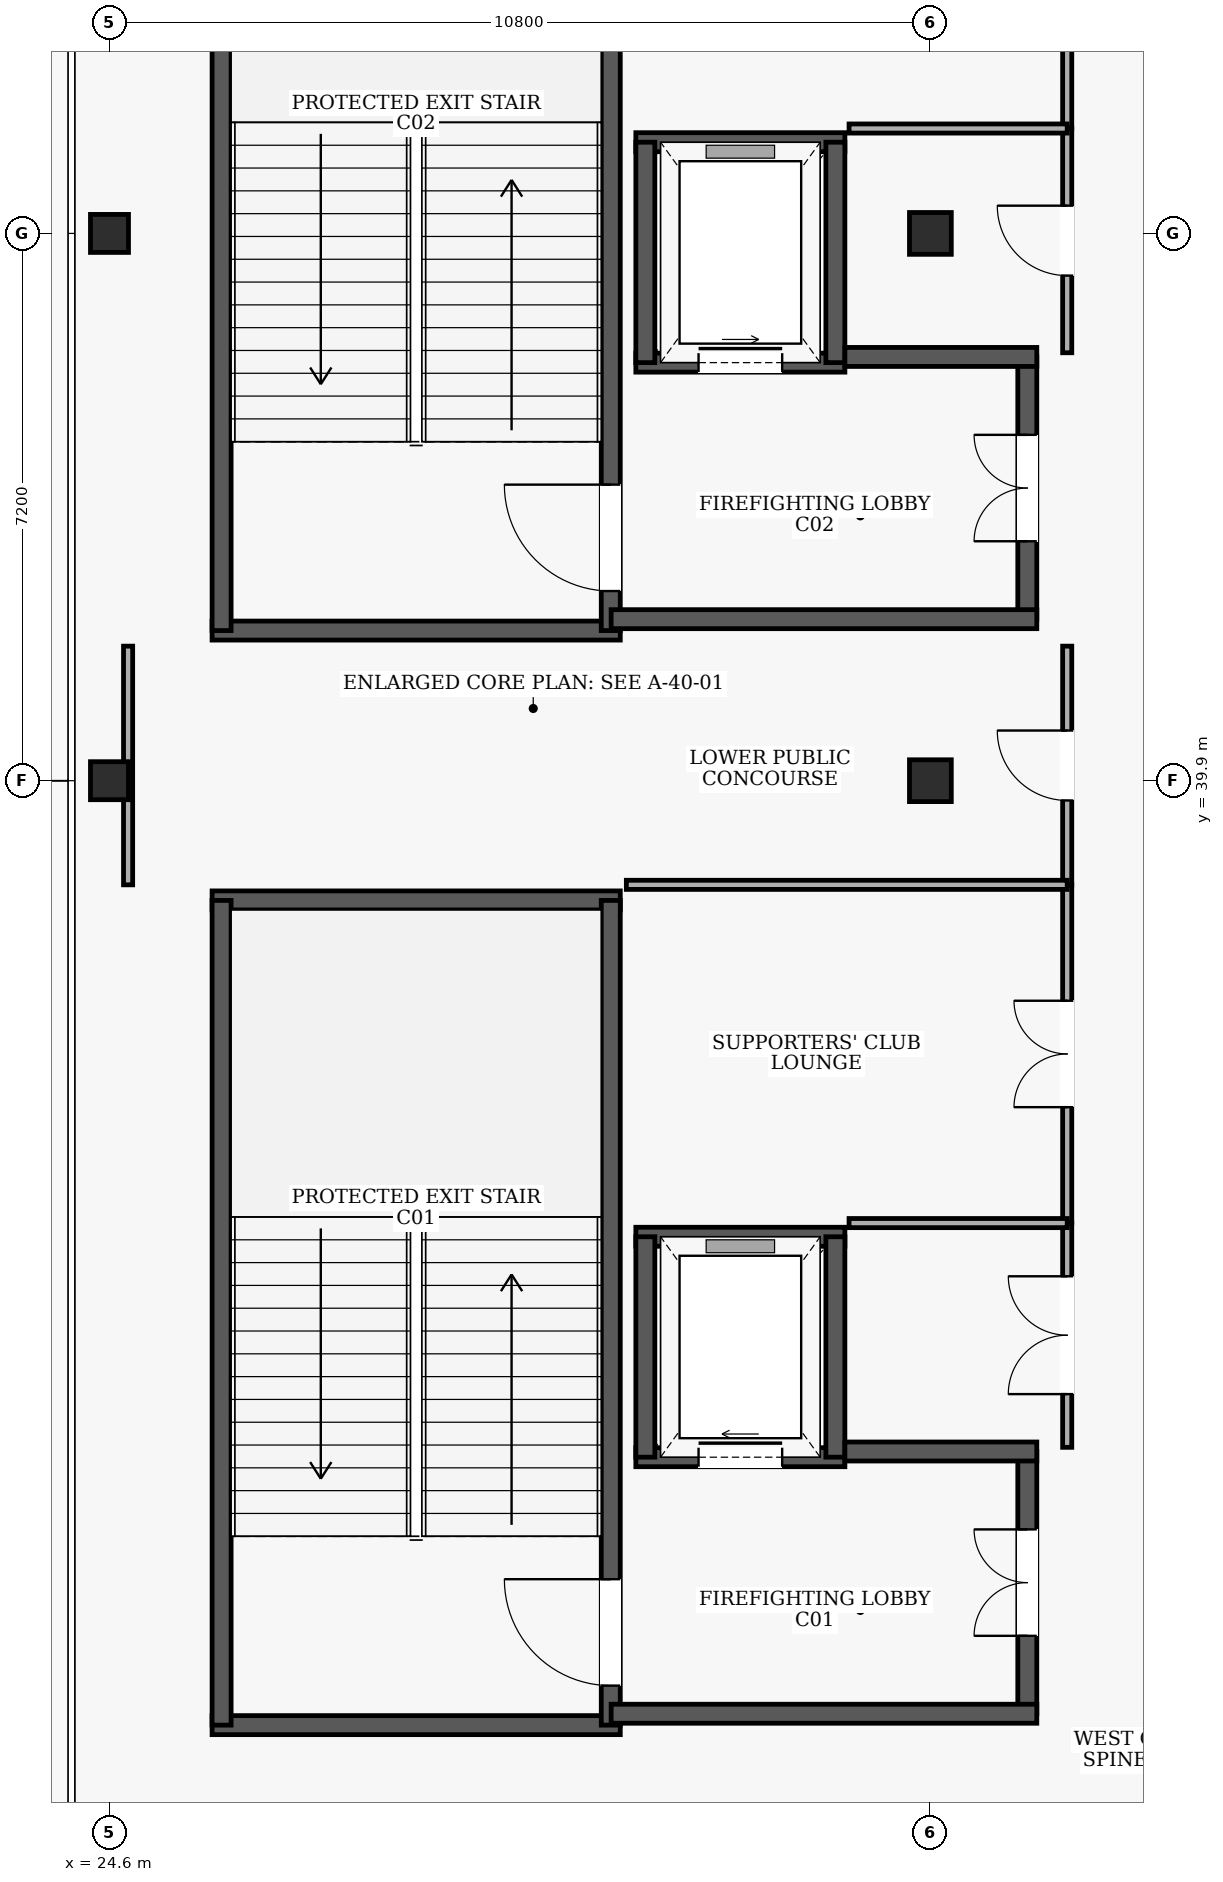
"""IFC4 building model, lengths in metres.
Left out: names, types, materials, properties, quantities, classifications, styles, units other than length and angle.
Written with IfcOpenShell. Run it as: python <this file> out.ifc"""

import sys

from ifc_helpers import new_model, si_unit, direction, frame, frame_2d, origin, origin_2d, place, context, subcontext, project, spatial, rectangle, extrude, element, fill, save


model = new_model("IFC4")
c1 = context("Model", 3, precision=1e-05, world=origin(), true_north=direction((0.0, 1.0)))
c2 = subcontext(c1, "Body", "Model", "MODEL_VIEW")
j1 = project(units=[si_unit("LENGTHUNIT", "METRE"), si_unit("PLANEANGLEUNIT", "RADIAN")], contexts=[c1])
p1 = place(None, origin())
s1 = spatial("IfcSite", under=j1, at=p1, CompositionType="ELEMENT")
p2 = place(p1, origin())
s2 = spatial("IfcBuilding", under=s1, at=p2, CompositionType="ELEMENT")
p3 = place(p2, frame((0.0, 0.0, 5.4)))
s3 = spatial("IfcBuildingStorey", under=s2, at=p3, CompositionType="ELEMENT", Elevation=5.4)
for number, where, z_axis, x_axis in (
    (1, (24.6, 39.9, 0.0), (0.0, 0.0, 1.0), (1.0, 0.0, 0.0)),
    (2, (24.6, 47.1, 0.0), (0.0, 0.0, 1.0), (1.0, 0.0, 0.0)),
):
    element("IfcColumn", number, at=place(p3, frame(where, z_axis=z_axis, x_axis=x_axis)), inside=s3, PredefinedType="COLUMN", context=c2, shape_type="SweptSolid", body=[
        extrude(rectangle(XDim=0.5, YDim=0.5, at=origin_2d()), origin(), (0.0, 0.0, 1.0), 4.8),
    ])
for number, where, z_axis, x_axis in (
    (3, (35.4, 39.9, 0.0), (0.0, 0.0, 1.0), (1.0, 0.0, 0.0)),
    (4, (35.4, 47.1, 0.0), (0.0, 0.0, 1.0), (1.0, 0.0, 0.0)),
):
    element("IfcColumn", number, at=place(p3, frame(where, z_axis=z_axis, x_axis=x_axis)), inside=s3, PredefinedType="COLUMN", context=c2, shape_type="SweptSolid", body=[
        extrude(rectangle(XDim=0.55, YDim=0.55, at=origin_2d()), origin(), (0.0, 0.0, 1.0), 4.8),
    ])
for number, where, z_axis, x_axis in (
    (5, (25.95, 27.475, 0.0), (0.0, 0.0, 1.0), (1.0, 0.0, 0.0)),
    (6, (31.32, 38.325, 0.0), (0.0, 0.0, 1.0), (-1.0, 0.0, 0.0)),
):
    element("IfcWall", number, at=place(p3, frame(where, z_axis=z_axis, x_axis=x_axis)), inside=s3, PredefinedType="SHEAR", context=c2, shape_type="SweptSolid", body=[
        extrude(rectangle(XDim=5.37, YDim=0.25, at=frame_2d((2.685, 0.0))), origin(), (0.0, 0.0, 1.0), 4.5),
    ])
p4 = place(p3, frame((26.075, 27.475, 0.0), z_axis=(0.0, 0.0, 1.0), x_axis=(0.0, 1.0, 0.0)))
e7 = element("IfcWall", 7, at=p4, inside=s3, PredefinedType="SHEAR", context=c2, shape_type="SweptSolid", body=[
    extrude(rectangle(XDim=10.85, YDim=0.25, at=frame_2d((5.425, 0.0))), origin(), (0.0, 0.0, 1.0), 4.5),
])
p5 = place(p3, frame((31.195, 27.475, 0.0), z_axis=(0.0, 0.0, 1.0), x_axis=(0.0, 1.0, 0.0)))
e8 = element("IfcWall", 8, at=p5, inside=s3, PredefinedType="SHEAR", context=c2, shape_type="SweptSolid", body=[
    extrude(rectangle(XDim=10.85, YDim=0.25, at=frame_2d((5.425, 0.0))), origin(), (0.0, 0.0, 1.0), 4.5),
])
p6 = place(p5, frame((0.52, 0.0, 0.0)))
e9 = element("IfcOpeningElement", 9, at=p6, cuts=e8, PredefinedType="OPENING", context=c2, shape_type="SweptSolid", body=[
    extrude(rectangle(XDim=1.4, YDim=2.15, at=frame_2d((0.7, 1.075))), frame((0.0, 0.135, 0.0), z_axis=(0.0, -1.0, 0.0), x_axis=(1.0, 0.0, 0.0)), (0.0, 0.0, 1.0), 0.27),
])
p7 = place(p3, frame((25.95, 41.875, 0.0), z_axis=(0.0, 0.0, 1.0), x_axis=(1.0, 0.0, 0.0)))
e10 = element("IfcWall", 10, at=p7, inside=s3, PredefinedType="SHEAR", context=c2, shape_type="SweptSolid", body=[
    extrude(rectangle(XDim=5.37, YDim=0.25, at=frame_2d((2.685, 0.0))), origin(), (0.0, 0.0, 1.0), 4.5),
])
p8 = place(p3, frame((26.075, 41.875, 0.0), z_axis=(0.0, 0.0, 1.0), x_axis=(0.0, 1.0, 0.0)))
e11 = element("IfcWall", 11, at=p8, inside=s3, PredefinedType="SHEAR", context=c2, shape_type="SweptSolid", body=[
    extrude(rectangle(XDim=10.85, YDim=0.25, at=frame_2d((5.425, 0.0))), origin(), (0.0, 0.0, 1.0), 4.5),
])
p9 = place(p3, frame((31.195, 41.875, 0.0), z_axis=(0.0, 0.0, 1.0), x_axis=(0.0, 1.0, 0.0)))
e12 = element("IfcWall", 12, at=p9, inside=s3, PredefinedType="SHEAR", context=c2, shape_type="SweptSolid", body=[
    extrude(rectangle(XDim=10.85, YDim=0.25, at=frame_2d((5.425, 0.0))), origin(), (0.0, 0.0, 1.0), 4.5),
])
p10 = place(p9, frame((0.52, 0.0, 0.0)))
e13 = element("IfcOpeningElement", 13, at=p10, cuts=e12, PredefinedType="OPENING", context=c2, shape_type="SweptSolid", body=[
    extrude(rectangle(XDim=1.4, YDim=2.15, at=frame_2d((0.7, 1.075))), frame((0.0, 0.135, 0.0), z_axis=(0.0, -1.0, 0.0), x_axis=(1.0, 0.0, 0.0)), (0.0, 0.0, 1.0), 0.27),
])
p11 = place(p3, frame((31.525, 31.0, 0.0), z_axis=(0.0, 0.0, 1.0), x_axis=(1.0, 0.0, 0.0)))
e14 = element("IfcWall", 14, at=p11, inside=s3, PredefinedType="SHEAR", context=c2, shape_type="SweptSolid", body=[
    extrude(rectangle(XDim=2.75, YDim=0.25, at=frame_2d((1.375, 0.0))), origin(), (0.0, 0.0, 1.0), 4.5),
])
p12 = place(p11, frame((0.825, 0.0, 0.0)))
e15 = element("IfcOpeningElement", 15, at=p12, cuts=e14, PredefinedType="OPENING", context=c2, shape_type="SweptSolid", body=[
    extrude(rectangle(XDim=1.1, YDim=2.15, at=frame_2d((0.55, 1.075))), frame((0.0, 0.135, 0.0), z_axis=(0.0, -1.0, 0.0), x_axis=(1.0, 0.0, 0.0)), (0.0, 0.0, 1.0), 0.27),
])
p13 = place(p3, frame((34.275, 33.9, 0.0), z_axis=(0.0, 0.0, 1.0), x_axis=(-1.0, 0.0, 0.0)))
e16 = element("IfcWall", 16, at=p13, inside=s3, PredefinedType="SHEAR", context=c2, shape_type="SweptSolid", body=[
    extrude(rectangle(XDim=2.75, YDim=0.25, at=frame_2d((1.375, 0.0))), origin(), (0.0, 0.0, 1.0), 4.5),
])
for number, where, z_axis, x_axis in (
    (17, (31.65, 33.9, 0.0), (0.0, 0.0, 1.0), (0.0, -1.0, 0.0)),
    (18, (34.15, 31.0, 0.0), (0.0, 0.0, 1.0), (0.0, 1.0, 0.0)),
):
    element("IfcWall", number, at=place(p3, frame(where, z_axis=z_axis, x_axis=x_axis)), inside=s3, PredefinedType="SHEAR", context=c2, shape_type="SweptSolid", body=[
        extrude(rectangle(XDim=2.9, YDim=0.25, at=frame_2d((1.45, 0.0))), origin(), (0.0, 0.0, 1.0), 4.5),
    ])
p14 = place(p3, frame((36.675, 27.625, 0.0), z_axis=(0.0, 0.0, 1.0), x_axis=(0.0, 1.0, 0.0)))
e19 = element("IfcWall", 19, at=p14, inside=s3, PredefinedType="SHEAR", context=c2, shape_type="SweptSolid", body=[
    extrude(rectangle(XDim=3.45, YDim=0.25, at=frame_2d((1.725, 0.0))), origin(), (0.0, 0.0, 1.0), 4.5),
])
p15 = place(p14, frame((1.025, 0.0, 0.0)))
e20 = element("IfcOpeningElement", 20, at=p15, cuts=e19, PredefinedType="OPENING", context=c2, shape_type="SweptSolid", body=[
    extrude(rectangle(XDim=1.4, YDim=2.15, at=frame_2d((0.7, 1.075))), frame((0.0, 0.135, 0.0), z_axis=(0.0, -1.0, 0.0), x_axis=(1.0, 0.0, 0.0)), (0.0, 0.0, 1.0), 0.27),
])
p16 = place(p3, frame((34.275, 31.075, 0.0), z_axis=(0.0, 0.0, 1.0), x_axis=(1.0, 0.0, 0.0)))
e21 = element("IfcWall", 21, at=p16, inside=s3, PredefinedType="SHEAR", context=c2, shape_type="SweptSolid", body=[
    extrude(rectangle(XDim=2.525, YDim=0.25, at=frame_2d((1.263, 0.0))), origin(), (0.0, 0.0, 1.0), 4.5),
])
p17 = place(p3, frame((31.2, 27.625, 0.0), z_axis=(0.0, 0.0, 1.0), x_axis=(1.0, 0.0, 0.0)))
e22 = element("IfcWall", 22, at=p17, inside=s3, PredefinedType="SHEAR", context=c2, shape_type="SweptSolid", body=[
    extrude(rectangle(XDim=5.6, YDim=0.25, at=frame_2d((2.8, 0.0))), origin(), (0.0, 0.0, 1.0), 4.5),
])
p18 = place(p3, frame((31.525, 45.4, 0.0), z_axis=(0.0, 0.0, 1.0), x_axis=(1.0, 0.0, 0.0)))
e23 = element("IfcWall", 23, at=p18, inside=s3, PredefinedType="SHEAR", context=c2, shape_type="SweptSolid", body=[
    extrude(rectangle(XDim=2.75, YDim=0.25, at=frame_2d((1.375, 0.0))), origin(), (0.0, 0.0, 1.0), 4.5),
])
p19 = place(p18, frame((0.825, 0.0, 0.0)))
e24 = element("IfcOpeningElement", 24, at=p19, cuts=e23, PredefinedType="OPENING", context=c2, shape_type="SweptSolid", body=[
    extrude(rectangle(XDim=1.1, YDim=2.15, at=frame_2d((0.55, 1.075))), frame((0.0, 0.135, 0.0), z_axis=(0.0, -1.0, 0.0), x_axis=(1.0, 0.0, 0.0)), (0.0, 0.0, 1.0), 0.27),
])
p20 = place(p3, frame((34.275, 48.3, 0.0), z_axis=(0.0, 0.0, 1.0), x_axis=(-1.0, 0.0, 0.0)))
e25 = element("IfcWall", 25, at=p20, inside=s3, PredefinedType="SHEAR", context=c2, shape_type="SweptSolid", body=[
    extrude(rectangle(XDim=2.75, YDim=0.25, at=frame_2d((1.375, 0.0))), origin(), (0.0, 0.0, 1.0), 4.5),
])
for number, where, z_axis, x_axis in (
    (26, (31.65, 48.3, 0.0), (0.0, 0.0, 1.0), (0.0, -1.0, 0.0)),
    (27, (34.15, 45.4, 0.0), (0.0, 0.0, 1.0), (0.0, 1.0, 0.0)),
):
    element("IfcWall", number, at=place(p3, frame(where, z_axis=z_axis, x_axis=x_axis)), inside=s3, PredefinedType="SHEAR", context=c2, shape_type="SweptSolid", body=[
        extrude(rectangle(XDim=2.9, YDim=0.25, at=frame_2d((1.45, 0.0))), origin(), (0.0, 0.0, 1.0), 4.5),
    ])
p21 = place(p3, frame((36.675, 42.025, 0.0), z_axis=(0.0, 0.0, 1.0), x_axis=(0.0, 1.0, 0.0)))
e28 = element("IfcWall", 28, at=p21, inside=s3, PredefinedType="SHEAR", context=c2, shape_type="SweptSolid", body=[
    extrude(rectangle(XDim=3.45, YDim=0.25, at=frame_2d((1.725, 0.0))), origin(), (0.0, 0.0, 1.0), 4.5),
])
p22 = place(p21, frame((1.025, 0.0, 0.0)))
e29 = element("IfcOpeningElement", 29, at=p22, cuts=e28, PredefinedType="OPENING", context=c2, shape_type="SweptSolid", body=[
    extrude(rectangle(XDim=1.4, YDim=2.15, at=frame_2d((0.7, 1.075))), frame((0.0, 0.135, 0.0), z_axis=(0.0, -1.0, 0.0), x_axis=(1.0, 0.0, 0.0)), (0.0, 0.0, 1.0), 0.27),
])
p23 = place(p3, frame((34.275, 45.475, 0.0), z_axis=(0.0, 0.0, 1.0), x_axis=(1.0, 0.0, 0.0)))
e30 = element("IfcWall", 30, at=p23, inside=s3, PredefinedType="SHEAR", context=c2, shape_type="SweptSolid", body=[
    extrude(rectangle(XDim=2.525, YDim=0.25, at=frame_2d((1.263, 0.0))), origin(), (0.0, 0.0, 1.0), 4.5),
])
p24 = place(p3, frame((31.2, 42.025, 0.0), z_axis=(0.0, 0.0, 1.0), x_axis=(1.0, 0.0, 0.0)))
e31 = element("IfcWall", 31, at=p24, inside=s3, PredefinedType="SHEAR", context=c2, shape_type="SweptSolid", body=[
    extrude(rectangle(XDim=5.6, YDim=0.25, at=frame_2d((2.8, 0.0))), origin(), (0.0, 0.0, 1.0), 4.5),
])
p25 = place(p3, frame((37.2, 38.53, 0.0), z_axis=(0.0, 0.0, 1.0), x_axis=(0.0, 1.0, 0.0)))
e32 = element("IfcWall", 32, at=p25, inside=s3, PredefinedType="PARTITIONING", context=c2, shape_type="SweptSolid", body=[
    extrude(rectangle(XDim=3.14, YDim=0.12, at=frame_2d((1.57, 0.0))), origin(), (0.0, 0.0, 1.0), 4.5),
])
p26 = place(p25, frame((1.11, 0.0, 0.0)))
e33 = element("IfcOpeningElement", 33, at=p26, cuts=e32, PredefinedType="OPENING", context=c2, shape_type="SweptSolid", body=[
    extrude(rectangle(XDim=0.92, YDim=2.1, at=frame_2d((0.46, 1.05))), frame((0.0, 0.07, 0.0), z_axis=(0.0, -1.0, 0.0), x_axis=(1.0, 0.0, 0.0)), (0.0, 0.0, 1.0), 0.14),
])
p27 = place(p3, frame((24.845, 41.67, 0.0), z_axis=(0.0, 0.0, 1.0), x_axis=(0.0, -1.0, 0.0)))
e34 = element("IfcWall", 34, at=p27, inside=s3, PredefinedType="PARTITIONING", context=c2, shape_type="SweptSolid", body=[
    extrude(rectangle(XDim=3.14, YDim=0.12, at=frame_2d((1.57, 0.0))), origin(), (0.0, 0.0, 1.0), 3.58),
])
p28 = place(p3, frame((37.2, 34.08, 0.0), z_axis=(0.0, 0.0, 1.0), x_axis=(0.0, 1.0, 0.0)))
e35 = element("IfcWall", 35, at=p28, inside=s3, PredefinedType="PARTITIONING", context=c2, shape_type="SweptSolid", body=[
    extrude(rectangle(XDim=4.45, YDim=0.12, at=frame_2d((2.225, 0.0))), origin(), (0.0, 0.0, 1.0), 4.5),
])
p29 = place(p28, frame((1.525, 0.0, 0.0)))
e36 = element("IfcOpeningElement", 36, at=p29, cuts=e35, PredefinedType="OPENING", context=c2, shape_type="SweptSolid", body=[
    extrude(rectangle(XDim=1.4, YDim=2.2, at=frame_2d((0.7, 1.1))), frame((0.0, 0.07, 0.0), z_axis=(0.0, -1.0, 0.0), x_axis=(1.0, 0.0, 0.0)), (0.0, 0.0, 1.0), 0.14),
])
p30 = place(p3, frame((37.2, 38.53, 0.0), z_axis=(0.0, 0.0, 1.0), x_axis=(-1.0, 0.0, 0.0)))
e37 = element("IfcWall", 37, at=p30, inside=s3, PredefinedType="PARTITIONING", context=c2, shape_type="SweptSolid", body=[
    extrude(rectangle(XDim=5.8, YDim=0.12, at=frame_2d((2.9, 0.0))), origin(), (0.0, 0.0, 1.0), 4.5),
])
p31 = place(p3, frame((37.2, 31.13, 0.0), z_axis=(0.0, 0.0, 1.0), x_axis=(0.0, 1.0, 0.0)))
e38 = element("IfcWall", 38, at=p31, inside=s3, PredefinedType="PARTITIONING", context=c2, shape_type="SweptSolid", body=[
    extrude(rectangle(XDim=2.95, YDim=0.12, at=frame_2d((1.475, 0.0))), origin(), (0.0, 0.0, 1.0), 4.5),
])
p32 = place(p31, frame((0.7, 0.0, 0.0)))
e39 = element("IfcOpeningElement", 39, at=p32, cuts=e38, PredefinedType="OPENING", context=c2, shape_type="SweptSolid", body=[
    extrude(rectangle(XDim=1.55, YDim=2.2, at=frame_2d((0.775, 1.1))), frame((0.0, 0.07, 0.0), z_axis=(0.0, -1.0, 0.0), x_axis=(1.0, 0.0, 0.0)), (0.0, 0.0, 1.0), 0.14),
])
p33 = place(p3, frame((37.2, 34.08, 0.0), z_axis=(0.0, 0.0, 1.0), x_axis=(-1.0, 0.0, 0.0)))
e40 = element("IfcWall", 40, at=p33, inside=s3, PredefinedType="PARTITIONING", context=c2, shape_type="SweptSolid", body=[
    extrude(rectangle(XDim=2.87, YDim=0.12, at=frame_2d((1.435, 0.0))), origin(), (0.0, 0.0, 1.0), 4.5),
])
p34 = place(p3, frame((37.2, 48.48, 0.0), z_axis=(0.0, 0.0, 1.0), x_axis=(0.0, 1.0, 0.0)))
e41 = element("IfcWall", 41, at=p34, inside=s3, PredefinedType="PARTITIONING", context=c2, shape_type="SweptSolid", body=[
    extrude(rectangle(XDim=4.45, YDim=0.12, at=frame_2d((2.225, 0.0))), origin(), (0.0, 0.0, 1.0), 4.5),
])
p35 = place(p34, frame((1.385, 0.0, 0.0)))
e42 = element("IfcOpeningElement", 42, at=p35, cuts=e41, PredefinedType="OPENING", context=c2, shape_type="SweptSolid", body=[
    extrude(rectangle(XDim=1.68, YDim=2.25, at=frame_2d((0.84, 1.125))), frame((0.0, 0.07, 0.0), z_axis=(0.0, -1.0, 0.0), x_axis=(1.0, 0.0, 0.0)), (0.0, 0.0, 1.0), 0.14),
])
p36 = place(p3, frame((37.2, 45.53, 0.0), z_axis=(0.0, 0.0, 1.0), x_axis=(0.0, 1.0, 0.0)))
e43 = element("IfcWall", 43, at=p36, inside=s3, PredefinedType="PARTITIONING", context=c2, shape_type="SweptSolid", body=[
    extrude(rectangle(XDim=2.95, YDim=0.12, at=frame_2d((1.475, 0.0))), origin(), (0.0, 0.0, 1.0), 4.5),
])
p37 = place(p36, frame((1.015, 0.0, 0.0)))
e44 = element("IfcOpeningElement", 44, at=p37, cuts=e43, PredefinedType="OPENING", context=c2, shape_type="SweptSolid", body=[
    extrude(rectangle(XDim=0.92, YDim=2.1, at=frame_2d((0.46, 1.05))), frame((0.0, 0.07, 0.0), z_axis=(0.0, -1.0, 0.0), x_axis=(1.0, 0.0, 0.0)), (0.0, 0.0, 1.0), 0.14),
])
p38 = place(p3, frame((37.2, 48.48, 0.0), z_axis=(0.0, 0.0, 1.0), x_axis=(-1.0, 0.0, 0.0)))
e45 = element("IfcWall", 45, at=p38, inside=s3, PredefinedType="PARTITIONING", context=c2, shape_type="SweptSolid", body=[
    extrude(rectangle(XDim=2.87, YDim=0.12, at=frame_2d((1.435, 0.0))), origin(), (0.0, 0.0, 1.0), 4.5),
])
p39 = place(p6, origin())
e46 = element("IfcDoor", 46, at=p39, inside=s3, OperationType="SINGLE_SWING_RIGHT", PredefinedType="DOOR", context=c2, shape_type="SweptSolid", body=[
    extrude(rectangle(XDim=1.4, YDim=2.15, at=frame_2d((0.7, 1.075))), frame((0.0, 0.025, 0.0), z_axis=(0.0, -1.0, 0.0), x_axis=(1.0, 0.0, 0.0)), (0.0, 0.0, 1.0), 0.05),
])
fill(e9, e46)
p40 = place(p10, origin())
e47 = element("IfcDoor", 47, at=p40, inside=s3, OperationType="SINGLE_SWING_RIGHT", PredefinedType="DOOR", context=c2, shape_type="SweptSolid", body=[
    extrude(rectangle(XDim=1.4, YDim=2.15, at=frame_2d((0.7, 1.075))), frame((0.0, 0.025, 0.0), z_axis=(0.0, -1.0, 0.0), x_axis=(1.0, 0.0, 0.0)), (0.0, 0.0, 1.0), 0.05),
])
fill(e13, e47)
p41 = place(p12, origin())
e48 = element("IfcDoor", 48, at=p41, inside=s3, OperationType="SLIDING_TO_RIGHT", PredefinedType="DOOR", context=c2, shape_type="SweptSolid", body=[
    extrude(rectangle(XDim=1.1, YDim=2.15, at=frame_2d((0.55, 1.075))), frame((0.0, 0.025, 0.0), z_axis=(0.0, -1.0, 0.0), x_axis=(1.0, 0.0, 0.0)), (0.0, 0.0, 1.0), 0.05),
])
fill(e15, e48)
p42 = place(p15, origin())
e49 = element("IfcDoor", 49, at=p42, inside=s3, OperationType="DOUBLE_DOOR_SINGLE_SWING", PredefinedType="DOOR", context=c2, shape_type="SweptSolid", body=[
    extrude(rectangle(XDim=1.4, YDim=2.15, at=frame_2d((0.7, 1.075))), frame((0.0, 0.025, 0.0), z_axis=(0.0, -1.0, 0.0), x_axis=(1.0, 0.0, 0.0)), (0.0, 0.0, 1.0), 0.05),
])
fill(e20, e49)
p43 = place(p19, origin())
e50 = element("IfcDoor", 50, at=p43, inside=s3, OperationType="SLIDING_TO_LEFT", PredefinedType="DOOR", context=c2, shape_type="SweptSolid", body=[
    extrude(rectangle(XDim=1.1, YDim=2.15, at=frame_2d((0.55, 1.075))), frame((0.0, 0.025, 0.0), z_axis=(0.0, -1.0, 0.0), x_axis=(1.0, 0.0, 0.0)), (0.0, 0.0, 1.0), 0.05),
])
fill(e24, e50)
p44 = place(p22, origin())
e51 = element("IfcDoor", 51, at=p44, inside=s3, OperationType="DOUBLE_DOOR_SINGLE_SWING", PredefinedType="DOOR", context=c2, shape_type="SweptSolid", body=[
    extrude(rectangle(XDim=1.4, YDim=2.15, at=frame_2d((0.7, 1.075))), frame((0.0, 0.025, 0.0), z_axis=(0.0, -1.0, 0.0), x_axis=(1.0, 0.0, 0.0)), (0.0, 0.0, 1.0), 0.05),
])
fill(e29, e51)
p45 = place(p26, origin())
e52 = element("IfcDoor", 52, at=p45, inside=s3, OperationType="SINGLE_SWING_RIGHT", PredefinedType="DOOR", context=c2, shape_type="SweptSolid", body=[
    extrude(rectangle(XDim=0.92, YDim=2.1, at=frame_2d((0.46, 1.05))), frame((0.0, 0.025, 0.0), z_axis=(0.0, -1.0, 0.0), x_axis=(1.0, 0.0, 0.0)), (0.0, 0.0, 1.0), 0.05),
])
fill(e33, e52)
p46 = place(p29, origin())
e53 = element("IfcDoor", 53, at=p46, inside=s3, OperationType="DOUBLE_DOOR_SINGLE_SWING", PredefinedType="DOOR", context=c2, shape_type="SweptSolid", body=[
    extrude(rectangle(XDim=1.4, YDim=2.2, at=frame_2d((0.7, 1.1))), frame((0.0, 0.025, 0.0), z_axis=(0.0, -1.0, 0.0), x_axis=(1.0, 0.0, 0.0)), (0.0, 0.0, 1.0), 0.05),
])
fill(e36, e53)
p47 = place(p32, origin())
e54 = element("IfcDoor", 54, at=p47, inside=s3, OperationType="DOUBLE_DOOR_SINGLE_SWING", PredefinedType="DOOR", context=c2, shape_type="SweptSolid", body=[
    extrude(rectangle(XDim=1.55, YDim=2.2, at=frame_2d((0.775, 1.1))), frame((0.0, 0.025, 0.0), z_axis=(0.0, -1.0, 0.0), x_axis=(1.0, 0.0, 0.0)), (0.0, 0.0, 1.0), 0.05),
])
fill(e39, e54)
p48 = place(p37, origin())
e55 = element("IfcDoor", 55, at=p48, inside=s3, OperationType="SINGLE_SWING_RIGHT", PredefinedType="DOOR", context=c2, shape_type="SweptSolid", body=[
    extrude(rectangle(XDim=0.92, YDim=2.1, at=frame_2d((0.46, 1.05))), frame((0.0, 0.025, 0.0), z_axis=(0.0, -1.0, 0.0), x_axis=(1.0, 0.0, 0.0)), (0.0, 0.0, 1.0), 0.05),
])
fill(e44, e55)
save(model, sys.argv[1])
